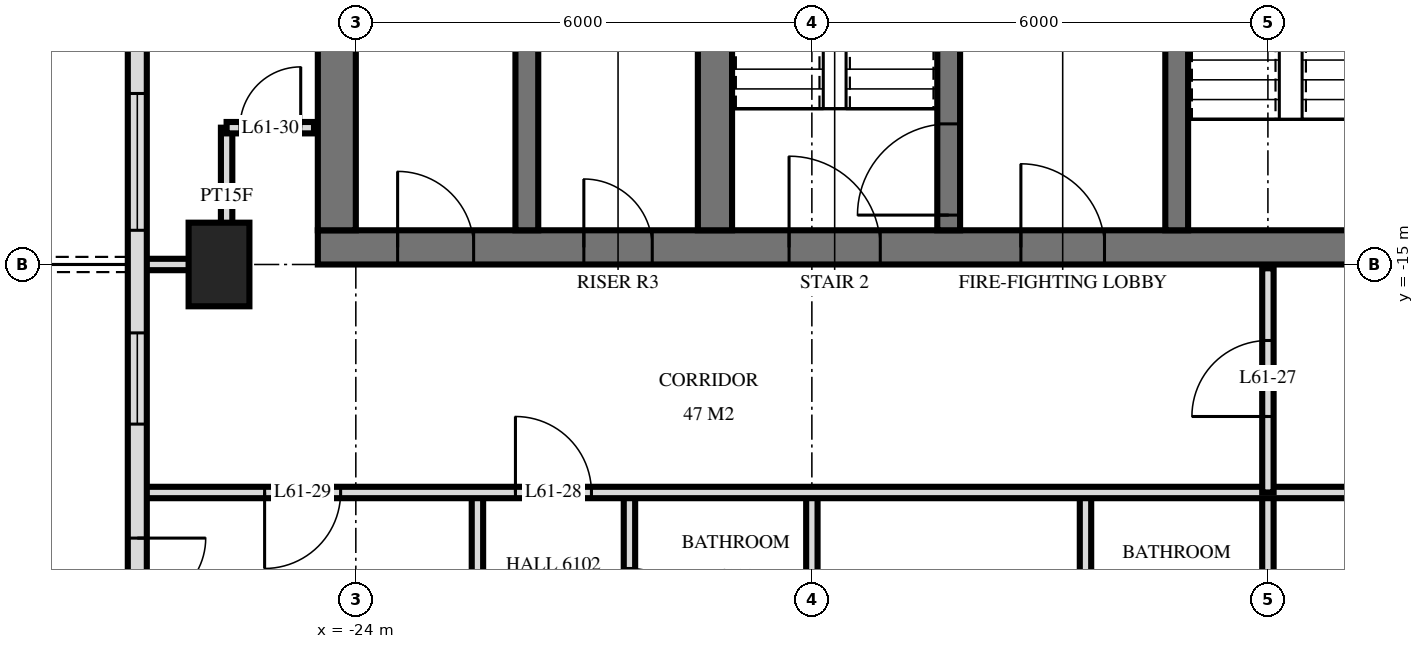
"""IFC4 building model, lengths in metres.
Left out: names, types, materials, properties, quantities, classifications, styles, units other than length and angle.
Written with IfcOpenShell. Run it as: python <this file> out.ifc"""

import sys

from ifc_helpers import new_model, si_unit, direction, frame, frame_2d, origin, origin_2d, place, context, subcontext, project, spatial, rectangle, extrude, element, fill, save


model = new_model("IFC4")
c1 = context("Model", 3, precision=1e-05, world=origin(), true_north=direction((0.0, 1.0)))
c2 = subcontext(c1, "Body", "Model", "MODEL_VIEW")
j1 = project(units=[si_unit("LENGTHUNIT", "METRE"), si_unit("PLANEANGLEUNIT", "RADIAN")], contexts=[c1])
p1 = place(None, origin())
s1 = spatial("IfcSite", under=j1, at=p1, CompositionType="ELEMENT")
p2 = place(p1, origin())
s2 = spatial("IfcBuilding", under=s1, at=p2, CompositionType="ELEMENT")
p3 = place(p2, frame((0.0, 0.0, 232.6)))
s3 = spatial("IfcBuildingStorey", under=s2, at=p3, CompositionType="ELEMENT", Elevation=232.6)
p4 = place(p3, frame((-25.8, -15.0, 0.0), z_axis=(0.0, 0.0, 1.0), x_axis=(0.0, 1.0, 0.0)))
e1 = element("IfcColumn", 1, at=p4, inside=s3, PredefinedType="COLUMN", context=c2, shape_type="SweptSolid", body=[
    extrude(rectangle(XDim=1.1, YDim=0.8, at=origin_2d()), origin(), (0.0, 0.0, 1.0), 3.5),
])
p5 = place(p3, frame((-24.5, -14.775, 0.0), z_axis=(0.0, 0.0, 1.0), x_axis=(1.0, 0.0, 0.0)))
e2 = element("IfcWall", 2, at=p5, inside=s3, PredefinedType="SHEAR", context=c2, shape_type="SweptSolid", body=[
    extrude(rectangle(XDim=14.5, YDim=0.45, at=frame_2d((7.25, 0.0))), origin(), (0.0, 0.0, 1.0), 3.5),
])
p6 = place(p5, frame((6.2, 0.0, 0.0)))
e3 = element("IfcOpeningElement", 3, at=p6, cuts=e2, PredefinedType="OPENING", context=c2, shape_type="SweptSolid", body=[
    extrude(rectangle(XDim=1.2, YDim=2.1, at=frame_2d((0.6, 1.05))), frame((0.0, 0.235, 0.0), z_axis=(0.0, -1.0, 0.0), x_axis=(1.0, 0.0, 0.0)), (0.0, 0.0, 1.0), 0.47),
])
p7 = place(p5, frame((9.25, 0.0, 0.0)))
e4 = element("IfcOpeningElement", 4, at=p7, cuts=e2, PredefinedType="OPENING", context=c2, shape_type="SweptSolid", body=[
    extrude(rectangle(XDim=1.1, YDim=2.1, at=frame_2d((0.55, 1.05))), frame((0.0, 0.235, 0.0), z_axis=(0.0, -1.0, 0.0), x_axis=(1.0, 0.0, 0.0)), (0.0, 0.0, 1.0), 0.47),
])
p8 = place(p5, frame((3.5, 0.0, 0.0)))
e5 = element("IfcOpeningElement", 5, at=p8, cuts=e2, PredefinedType="OPENING", context=c2, shape_type="SweptSolid", body=[
    extrude(rectangle(XDim=0.9, YDim=2.1, at=frame_2d((0.45, 1.05))), frame((0.0, 0.235, 0.0), z_axis=(0.0, -1.0, 0.0), x_axis=(1.0, 0.0, 0.0)), (0.0, 0.0, 1.0), 0.47),
])
p9 = place(p5, frame((1.05, 0.0, 0.0)))
e6 = element("IfcOpeningElement", 6, at=p9, cuts=e2, PredefinedType="OPENING", context=c2, shape_type="SweptSolid", body=[
    extrude(rectangle(XDim=1.0, YDim=2.1, at=frame_2d((0.5, 1.05))), frame((0.0, 0.235, 0.0), z_axis=(0.0, -1.0, 0.0), x_axis=(1.0, 0.0, 0.0)), (0.0, 0.0, 1.0), 0.47),
])
p10 = place(p3, frame((-24.25, -14.55, 0.0), z_axis=(0.0, 0.0, 1.0), x_axis=(0.0, 1.0, 0.0)))
e7 = element("IfcWall", 7, at=p10, inside=s3, PredefinedType="SHEAR", context=c2, shape_type="SweptSolid", body=[
    extrude(rectangle(XDim=14.1, YDim=0.5, at=frame_2d((7.05, 0.0))), origin(), (0.0, 0.0, 1.0), 3.5),
])
p11 = place(p3, frame((-13.2, -14.55, 0.0), z_axis=(0.0, 0.0, 1.0), x_axis=(0.0, 1.0, 0.0)))
e8 = element("IfcWall", 8, at=p11, inside=s3, PredefinedType="SHEAR", context=c2, shape_type="SweptSolid", body=[
    extrude(rectangle(XDim=5.4, YDim=0.3, at=frame_2d((2.7, 0.0))), origin(), (0.0, 0.0, 1.0), 3.5),
])
p12 = place(p11, frame((4.0, 0.0, 0.0)))
e9 = element("IfcOpeningElement", 9, at=p12, cuts=e8, PredefinedType="OPENING", context=c2, shape_type="SweptSolid", body=[
    extrude(rectangle(XDim=1.2, YDim=2.1, at=frame_2d((0.6, 1.05))), frame((0.0, 0.16, 0.0), z_axis=(0.0, -1.0, 0.0), x_axis=(1.0, 0.0, 0.0)), (0.0, 0.0, 1.0), 0.32),
])
p13 = place(p3, frame((-16.2, -14.55, 0.0), z_axis=(0.0, 0.0, 1.0), x_axis=(0.0, 1.0, 0.0)))
e10 = element("IfcWall", 10, at=p13, inside=s3, PredefinedType="SHEAR", context=c2, shape_type="SweptSolid", body=[
    extrude(rectangle(XDim=5.4, YDim=0.3, at=frame_2d((2.7, 0.0))), origin(), (0.0, 0.0, 1.0), 3.5),
])
p14 = place(p13, frame((0.2, 0.0, 0.0)))
e11 = element("IfcOpeningElement", 11, at=p14, cuts=e10, PredefinedType="OPENING", context=c2, shape_type="SweptSolid", body=[
    extrude(rectangle(XDim=1.2, YDim=2.1, at=frame_2d((0.6, 1.05))), frame((0.0, 0.16, 0.0), z_axis=(0.0, -1.0, 0.0), x_axis=(1.0, 0.0, 0.0)), (0.0, 0.0, 1.0), 0.32),
])
p15 = place(p3, frame((-19.275, -14.55, 0.0), z_axis=(0.0, 0.0, 1.0), x_axis=(0.0, 1.0, 0.0)))
e12 = element("IfcWall", 12, at=p15, inside=s3, PredefinedType="SHEAR", context=c2, shape_type="SweptSolid", body=[
    extrude(rectangle(XDim=5.4, YDim=0.45, at=frame_2d((2.7, 0.0))), origin(), (0.0, 0.0, 1.0), 3.5),
])
p16 = place(p3, frame((-21.75, -14.55, 0.0), z_axis=(0.0, 0.0, 1.0), x_axis=(0.0, 1.0, 0.0)))
e13 = element("IfcWall", 13, at=p16, inside=s3, PredefinedType="SHEAR", context=c2, shape_type="SweptSolid", body=[
    extrude(rectangle(XDim=5.4, YDim=0.3, at=frame_2d((2.7, 0.0))), origin(), (0.0, 0.0, 1.0), 3.5),
])
p17 = place(p3, frame((-26.875, -3.325, 0.0), z_axis=(0.0, 0.0, 1.0), x_axis=(0.0, -1.0, 0.0)))
e14 = element("IfcWall", 14, at=p17, inside=s3, PredefinedType="SOLIDWALL", context=c2, shape_type="SweptSolid", body=[
    extrude(rectangle(XDim=21.551, YDim=0.25, at=frame_2d((10.775, 0.0))), origin(), (0.0, 0.0, 1.0), 3.22),
])
p18 = place(p17, frame((6.575, 0.0, 0.0)))
e15 = element("IfcOpeningElement", 15, at=p18, cuts=e14, PredefinedType="OPENING", context=c2, shape_type="SweptSolid", body=[
    extrude(rectangle(XDim=1.8, YDim=2.4, at=frame_2d((0.9, 1.2))), frame((0.0, 0.135, 0.0), z_axis=(0.0, -1.0, 0.0), x_axis=(1.0, 0.0, 0.0)), (0.0, 0.0, 1.0), 0.27),
])
p19 = place(p17, frame((9.425, 0.0, 0.9)))
e16 = element("IfcOpeningElement", 16, at=p19, cuts=e14, PredefinedType="OPENING", context=c2, shape_type="SweptSolid", body=[
    extrude(rectangle(XDim=1.8, YDim=1.5, at=frame_2d((0.9, 0.75))), frame((0.0, 0.135, 0.0), z_axis=(0.0, -1.0, 0.0), x_axis=(1.0, 0.0, 0.0)), (0.0, 0.0, 1.0), 0.27),
])
p20 = place(p17, frame((12.575, 0.0, 0.9)))
e17 = element("IfcOpeningElement", 17, at=p20, cuts=e14, PredefinedType="OPENING", context=c2, shape_type="SweptSolid", body=[
    extrude(rectangle(XDim=1.2, YDim=1.5, at=frame_2d((0.6, 0.75))), frame((0.0, 0.135, 0.0), z_axis=(0.0, -1.0, 0.0), x_axis=(1.0, 0.0, 0.0)), (0.0, 0.0, 1.0), 0.27),
])
p21 = place(p17, frame((15.275, 0.0, 0.0)))
e18 = element("IfcOpeningElement", 18, at=p21, cuts=e14, PredefinedType="OPENING", context=c2, shape_type="SweptSolid", body=[
    extrude(rectangle(XDim=1.8, YDim=2.4, at=frame_2d((0.9, 1.2))), frame((0.0, 0.135, 0.0), z_axis=(0.0, -1.0, 0.0), x_axis=(1.0, 0.0, 0.0)), (0.0, 0.0, 1.0), 0.27),
])
p22 = place(p17, frame((18.875, 0.0, 0.0)))
e19 = element("IfcOpeningElement", 19, at=p22, cuts=e14, PredefinedType="OPENING", context=c2, shape_type="SweptSolid", body=[
    extrude(rectangle(XDim=1.8, YDim=2.4, at=frame_2d((0.9, 1.2))), frame((0.0, 0.135, 0.0), z_axis=(0.0, -1.0, 0.0), x_axis=(1.0, 0.0, 0.0)), (0.0, 0.0, 1.0), 0.27),
])
p23 = place(p3, frame((-12.0, -18.0, 0.0), z_axis=(0.0, 0.0, 1.0), x_axis=(0.0, 1.0, 0.0)))
e20 = element("IfcWall", 20, at=p23, inside=s3, PredefinedType="PARTITIONING", context=c2, shape_type="SweptSolid", body=[
    extrude(rectangle(XDim=2.95, YDim=0.15, at=frame_2d((1.475, 0.0))), origin(), (0.0, 0.0, 1.0), 3.22),
])
p24 = place(p23, frame((1.0, 0.0, 0.0)))
e21 = element("IfcOpeningElement", 21, at=p24, cuts=e20, PredefinedType="OPENING", context=c2, shape_type="SweptSolid", body=[
    extrude(rectangle(XDim=1.0, YDim=2.1, at=frame_2d((0.5, 1.05))), frame((0.0, 0.085, 0.0), z_axis=(0.0, -1.0, 0.0), x_axis=(1.0, 0.0, 0.0)), (0.0, 0.0, 1.0), 0.17),
])
p25 = place(p3, frame((-12.0, -29.22, 0.0), z_axis=(0.0, 0.0, 1.0), x_axis=(0.0, 1.0, 0.0)))
e22 = element("IfcWall", 22, at=p25, inside=s3, PredefinedType="PARTITIONING", context=c2, shape_type="SweptSolid", body=[
    extrude(rectangle(XDim=11.22, YDim=0.15, at=frame_2d((5.61, 0.0))), origin(), (0.0, 0.0, 1.0), 3.22),
])
for number, where, z_axis, x_axis in (
    (23, (-14.4, -21.0, 0.0), (0.0, 0.0, 1.0), (0.0, 1.0, 0.0)),
    (24, (-18.0, -21.0, 0.0), (0.0, 0.0, 1.0), (0.0, 1.0, 0.0)),
):
    element("IfcWall", number, at=place(p3, frame(where, z_axis=z_axis, x_axis=x_axis)), inside=s3, PredefinedType="PARTITIONING", context=c2, shape_type="SweptSolid", body=[
        extrude(rectangle(XDim=3.0, YDim=0.15, at=frame_2d((1.5, 0.0))), origin(), (0.0, 0.0, 1.0), 3.22),
    ])
p26 = place(p3, frame((-20.4, -21.0, 0.0), z_axis=(0.0, 0.0, 1.0), x_axis=(0.0, 1.0, 0.0)))
e25 = element("IfcWall", 25, at=p26, inside=s3, PredefinedType="PARTITIONING", context=c2, shape_type="SweptSolid", body=[
    extrude(rectangle(XDim=3.0, YDim=0.15, at=frame_2d((1.5, 0.0))), origin(), (0.0, 0.0, 1.0), 3.22),
])
p27 = place(p26, frame((1.0, 0.0, 0.0)))
e26 = element("IfcOpeningElement", 26, at=p27, cuts=e25, PredefinedType="OPENING", context=c2, shape_type="SweptSolid", body=[
    extrude(rectangle(XDim=1.0, YDim=2.1, at=frame_2d((0.5, 1.05))), frame((0.0, 0.085, 0.0), z_axis=(0.0, -1.0, 0.0), x_axis=(1.0, 0.0, 0.0)), (0.0, 0.0, 1.0), 0.17),
])
p28 = place(p3, frame((-22.4, -21.0, 0.0), z_axis=(0.0, 0.0, 1.0), x_axis=(0.0, 1.0, 0.0)))
e27 = element("IfcWall", 27, at=p28, inside=s3, PredefinedType="PARTITIONING", context=c2, shape_type="SweptSolid", body=[
    extrude(rectangle(XDim=3.0, YDim=0.15, at=frame_2d((1.5, 0.0))), origin(), (0.0, 0.0, 1.0), 3.22),
])
p29 = place(p3, frame((-25.7, -15.0, 0.0), z_axis=(0.0, 0.0, 1.0), x_axis=(0.0, 1.0, 0.0)))
e28 = element("IfcWall", 28, at=p29, inside=s3, PredefinedType="PARTITIONING", context=c2, shape_type="SweptSolid", body=[
    extrude(rectangle(XDim=1.8, YDim=0.15, at=frame_2d((0.9, 0.0))), origin(), (0.0, 0.0, 1.0), 3.22),
])
p30 = place(p3, frame((-26.82, -18.0, 0.0), z_axis=(0.0, 0.0, 1.0), x_axis=(1.0, 0.0, 0.0)))
e29 = element("IfcWall", 29, at=p30, inside=s3, PredefinedType="PARTITIONING", context=c2, shape_type="SweptSolid", body=[
    extrude(rectangle(XDim=53.64, YDim=0.15, at=frame_2d((26.82, 0.0))), origin(), (0.0, 0.0, 1.0), 3.22),
])
p31 = place(p30, frame((4.92, 0.0, 0.0)))
e30 = element("IfcOpeningElement", 30, at=p31, cuts=e29, PredefinedType="OPENING", context=c2, shape_type="SweptSolid", body=[
    extrude(rectangle(XDim=1.0, YDim=2.1, at=frame_2d((0.5, 1.05))), frame((0.0, 0.085, 0.0), z_axis=(0.0, -1.0, 0.0), x_axis=(1.0, 0.0, 0.0)), (0.0, 0.0, 1.0), 0.17),
])
p32 = place(p30, frame((1.62, 0.0, 0.0)))
e31 = element("IfcOpeningElement", 31, at=p32, cuts=e29, PredefinedType="OPENING", context=c2, shape_type="SweptSolid", body=[
    extrude(rectangle(XDim=1.0, YDim=2.1, at=frame_2d((0.5, 1.05))), frame((0.0, 0.085, 0.0), z_axis=(0.0, -1.0, 0.0), x_axis=(1.0, 0.0, 0.0)), (0.0, 0.0, 1.0), 0.17),
])
p33 = place(p30, frame((38.97, 0.0, 0.0)))
e32 = element("IfcOpeningElement", 32, at=p33, cuts=e29, PredefinedType="OPENING", context=c2, shape_type="SweptSolid", body=[
    extrude(rectangle(XDim=1.0, YDim=2.1, at=frame_2d((0.5, 1.05))), frame((0.0, 0.085, 0.0), z_axis=(0.0, -1.0, 0.0), x_axis=(1.0, 0.0, 0.0)), (0.0, 0.0, 1.0), 0.17),
])
p34 = place(p30, frame((48.72, 0.0, 0.0)))
e33 = element("IfcOpeningElement", 33, at=p34, cuts=e29, PredefinedType="OPENING", context=c2, shape_type="SweptSolid", body=[
    extrude(rectangle(XDim=1.0, YDim=2.1, at=frame_2d((0.5, 1.05))), frame((0.0, 0.085, 0.0), z_axis=(0.0, -1.0, 0.0), x_axis=(1.0, 0.0, 0.0)), (0.0, 0.0, 1.0), 0.17),
])
p35 = place(p30, frame((46.92, 0.0, 0.0)))
e34 = element("IfcOpeningElement", 34, at=p35, cuts=e29, PredefinedType="OPENING", context=c2, shape_type="SweptSolid", body=[
    extrude(rectangle(XDim=1.0, YDim=2.1, at=frame_2d((0.5, 1.05))), frame((0.0, 0.085, 0.0), z_axis=(0.0, -1.0, 0.0), x_axis=(1.0, 0.0, 0.0)), (0.0, 0.0, 1.0), 0.17),
])
p36 = place(p30, frame((18.82, 0.0, 0.0)))
e35 = element("IfcOpeningElement", 35, at=p36, cuts=e29, PredefinedType="OPENING", context=c2, shape_type="SweptSolid", body=[
    extrude(rectangle(XDim=1.0, YDim=2.1, at=frame_2d((0.5, 1.05))), frame((0.0, 0.085, 0.0), z_axis=(0.0, -1.0, 0.0), x_axis=(1.0, 0.0, 0.0)), (0.0, 0.0, 1.0), 0.17),
])
p37 = place(p30, frame((27.82, 0.0, 0.0)))
e36 = element("IfcOpeningElement", 36, at=p37, cuts=e29, PredefinedType="OPENING", context=c2, shape_type="SweptSolid", body=[
    extrude(rectangle(XDim=1.0, YDim=2.1, at=frame_2d((0.5, 1.05))), frame((0.0, 0.085, 0.0), z_axis=(0.0, -1.0, 0.0), x_axis=(1.0, 0.0, 0.0)), (0.0, 0.0, 1.0), 0.17),
])
p38 = place(p30, frame((35.32, 0.0, 0.0)))
e37 = element("IfcOpeningElement", 37, at=p38, cuts=e29, PredefinedType="OPENING", context=c2, shape_type="SweptSolid", body=[
    extrude(rectangle(XDim=1.0, YDim=2.1, at=frame_2d((0.5, 1.05))), frame((0.0, 0.085, 0.0), z_axis=(0.0, -1.0, 0.0), x_axis=(1.0, 0.0, 0.0)), (0.0, 0.0, 1.0), 0.17),
])
p39 = place(p3, frame((-26.82, -15.0, 0.0), z_axis=(0.0, 0.0, 1.0), x_axis=(1.0, 0.0, 0.0)))
e38 = element("IfcWall", 38, at=p39, inside=s3, PredefinedType="PARTITIONING", context=c2, shape_type="SweptSolid", body=[
    extrude(rectangle(XDim=1.12, YDim=0.15, at=frame_2d((0.56, 0.0))), origin(), (0.0, 0.0, 1.0), 3.22),
])
p40 = place(p3, frame((-25.7, -13.2, 0.0), z_axis=(0.0, 0.0, 1.0), x_axis=(1.0, 0.0, 0.0)))
e39 = element("IfcWall", 39, at=p40, inside=s3, PredefinedType="PARTITIONING", context=c2, shape_type="SweptSolid", body=[
    extrude(rectangle(XDim=1.15, YDim=0.15, at=frame_2d((0.575, 0.0))), origin(), (0.0, 0.0, 1.0), 3.22),
])
p41 = place(p40, frame((0.175, 0.0, 0.0)))
e40 = element("IfcOpeningElement", 40, at=p41, cuts=e39, PredefinedType="OPENING", context=c2, shape_type="SweptSolid", body=[
    extrude(rectangle(XDim=0.8, YDim=2.1, at=frame_2d((0.4, 1.05))), frame((0.0, 0.085, 0.0), z_axis=(0.0, -1.0, 0.0), x_axis=(1.0, 0.0, 0.0)), (0.0, 0.0, 1.0), 0.17),
])
p42 = place(p19, origin())
e41 = element("IfcWindow", 41, at=p42, inside=s3, PartitioningType="SINGLE_PANEL", PredefinedType="WINDOW", context=c2, shape_type="SweptSolid", body=[
    extrude(rectangle(XDim=1.8, YDim=1.5, at=frame_2d((0.9, 0.75))), frame((0.0, 0.03, 0.0), z_axis=(0.0, -1.0, 0.0), x_axis=(1.0, 0.0, 0.0)), (0.0, 0.0, 1.0), 0.06),
])
fill(e16, e41)
p43 = place(p20, origin())
e42 = element("IfcWindow", 42, at=p43, inside=s3, PartitioningType="SINGLE_PANEL", PredefinedType="WINDOW", context=c2, shape_type="SweptSolid", body=[
    extrude(rectangle(XDim=1.2, YDim=1.5, at=frame_2d((0.6, 0.75))), frame((0.0, 0.03, 0.0), z_axis=(0.0, -1.0, 0.0), x_axis=(1.0, 0.0, 0.0)), (0.0, 0.0, 1.0), 0.06),
])
fill(e17, e42)
p44 = place(p21, origin())
e43 = element("IfcDoor", 43, at=p44, inside=s3, OperationType="DOUBLE_DOOR_SINGLE_SWING", PredefinedType="DOOR", context=c2, shape_type="SweptSolid", body=[
    extrude(rectangle(XDim=1.8, YDim=2.4, at=frame_2d((0.9, 1.2))), frame((0.0, 0.025, 0.0), z_axis=(0.0, -1.0, 0.0), x_axis=(1.0, 0.0, 0.0)), (0.0, 0.0, 1.0), 0.05),
])
fill(e18, e43)
p45 = place(p6, origin())
e44 = element("IfcDoor", 44, at=p45, inside=s3, OperationType="SINGLE_SWING_RIGHT", PredefinedType="DOOR", context=c2, shape_type="SweptSolid", body=[
    extrude(rectangle(XDim=1.2, YDim=2.1, at=frame_2d((0.6, 1.05))), frame((0.0, 0.025, 0.0), z_axis=(0.0, -1.0, 0.0), x_axis=(1.0, 0.0, 0.0)), (0.0, 0.0, 1.0), 0.05),
])
fill(e3, e44)
p46 = place(p7, origin())
e45 = element("IfcDoor", 45, at=p46, inside=s3, OperationType="SINGLE_SWING_RIGHT", PredefinedType="DOOR", context=c2, shape_type="SweptSolid", body=[
    extrude(rectangle(XDim=1.1, YDim=2.1, at=frame_2d((0.55, 1.05))), frame((0.0, 0.025, 0.0), z_axis=(0.0, -1.0, 0.0), x_axis=(1.0, 0.0, 0.0)), (0.0, 0.0, 1.0), 0.05),
])
fill(e4, e45)
p47 = place(p8, origin())
e46 = element("IfcDoor", 46, at=p47, inside=s3, OperationType="SINGLE_SWING_RIGHT", PredefinedType="DOOR", context=c2, shape_type="SweptSolid", body=[
    extrude(rectangle(XDim=0.9, YDim=2.1, at=frame_2d((0.45, 1.05))), frame((0.0, 0.025, 0.0), z_axis=(0.0, -1.0, 0.0), x_axis=(1.0, 0.0, 0.0)), (0.0, 0.0, 1.0), 0.05),
])
fill(e5, e46)
p48 = place(p9, origin())
e47 = element("IfcDoor", 47, at=p48, inside=s3, OperationType="SINGLE_SWING_RIGHT", PredefinedType="DOOR", context=c2, shape_type="SweptSolid", body=[
    extrude(rectangle(XDim=1.0, YDim=2.1, at=frame_2d((0.5, 1.05))), frame((0.0, 0.025, 0.0), z_axis=(0.0, -1.0, 0.0), x_axis=(1.0, 0.0, 0.0)), (0.0, 0.0, 1.0), 0.05),
])
fill(e6, e47)
p49 = place(p14, origin())
e48 = element("IfcDoor", 48, at=p49, inside=s3, OperationType="SINGLE_SWING_RIGHT", PredefinedType="DOOR", context=c2, shape_type="SweptSolid", body=[
    extrude(rectangle(XDim=1.2, YDim=2.1, at=frame_2d((0.6, 1.05))), frame((0.0, 0.025, 0.0), z_axis=(0.0, -1.0, 0.0), x_axis=(1.0, 0.0, 0.0)), (0.0, 0.0, 1.0), 0.05),
])
fill(e11, e48)
p50 = place(p24, origin())
e49 = element("IfcDoor", 49, at=p50, inside=s3, OperationType="SINGLE_SWING_RIGHT", PredefinedType="DOOR", context=c2, shape_type="SweptSolid", body=[
    extrude(rectangle(XDim=1.0, YDim=2.1, at=frame_2d((0.5, 1.05))), frame((0.0, 0.025, 0.0), z_axis=(0.0, -1.0, 0.0), x_axis=(1.0, 0.0, 0.0)), (0.0, 0.0, 1.0), 0.05),
])
fill(e21, e49)
p51 = place(p31, origin())
e50 = element("IfcDoor", 50, at=p51, inside=s3, OperationType="SINGLE_SWING_RIGHT", PredefinedType="DOOR", context=c2, shape_type="SweptSolid", body=[
    extrude(rectangle(XDim=1.0, YDim=2.1, at=frame_2d((0.5, 1.05))), frame((0.0, 0.025, 0.0), z_axis=(0.0, -1.0, 0.0), x_axis=(1.0, 0.0, 0.0)), (0.0, 0.0, 1.0), 0.05),
])
fill(e30, e50)
p52 = place(p32, frame((0.5, 0.0, 0.0), z_axis=(0.0, 0.0, 1.0), x_axis=(-1.0, 0.0, 0.0)))
e51 = element("IfcDoor", 51, at=p52, inside=s3, OperationType="SINGLE_SWING_LEFT", PredefinedType="DOOR", context=c2, shape_type="SweptSolid", body=[
    extrude(rectangle(XDim=1.0, YDim=2.1, at=frame_2d((0.0, 1.05))), frame((0.0, -0.025, 0.0), z_axis=(0.0, 1.0, 0.0), x_axis=(-1.0, 0.0, 0.0)), (0.0, 0.0, 1.0), 0.05),
])
fill(e31, e51)
p53 = place(p41, origin())
e52 = element("IfcDoor", 52, at=p53, inside=s3, OperationType="SINGLE_SWING_LEFT", PredefinedType="DOOR", context=c2, shape_type="SweptSolid", body=[
    extrude(rectangle(XDim=0.8, YDim=2.1, at=frame_2d((0.4, 1.05))), frame((0.0, 0.025, 0.0), z_axis=(0.0, -1.0, 0.0), x_axis=(1.0, 0.0, 0.0)), (0.0, 0.0, 1.0), 0.05),
])
fill(e40, e52)
save(model, sys.argv[1])
